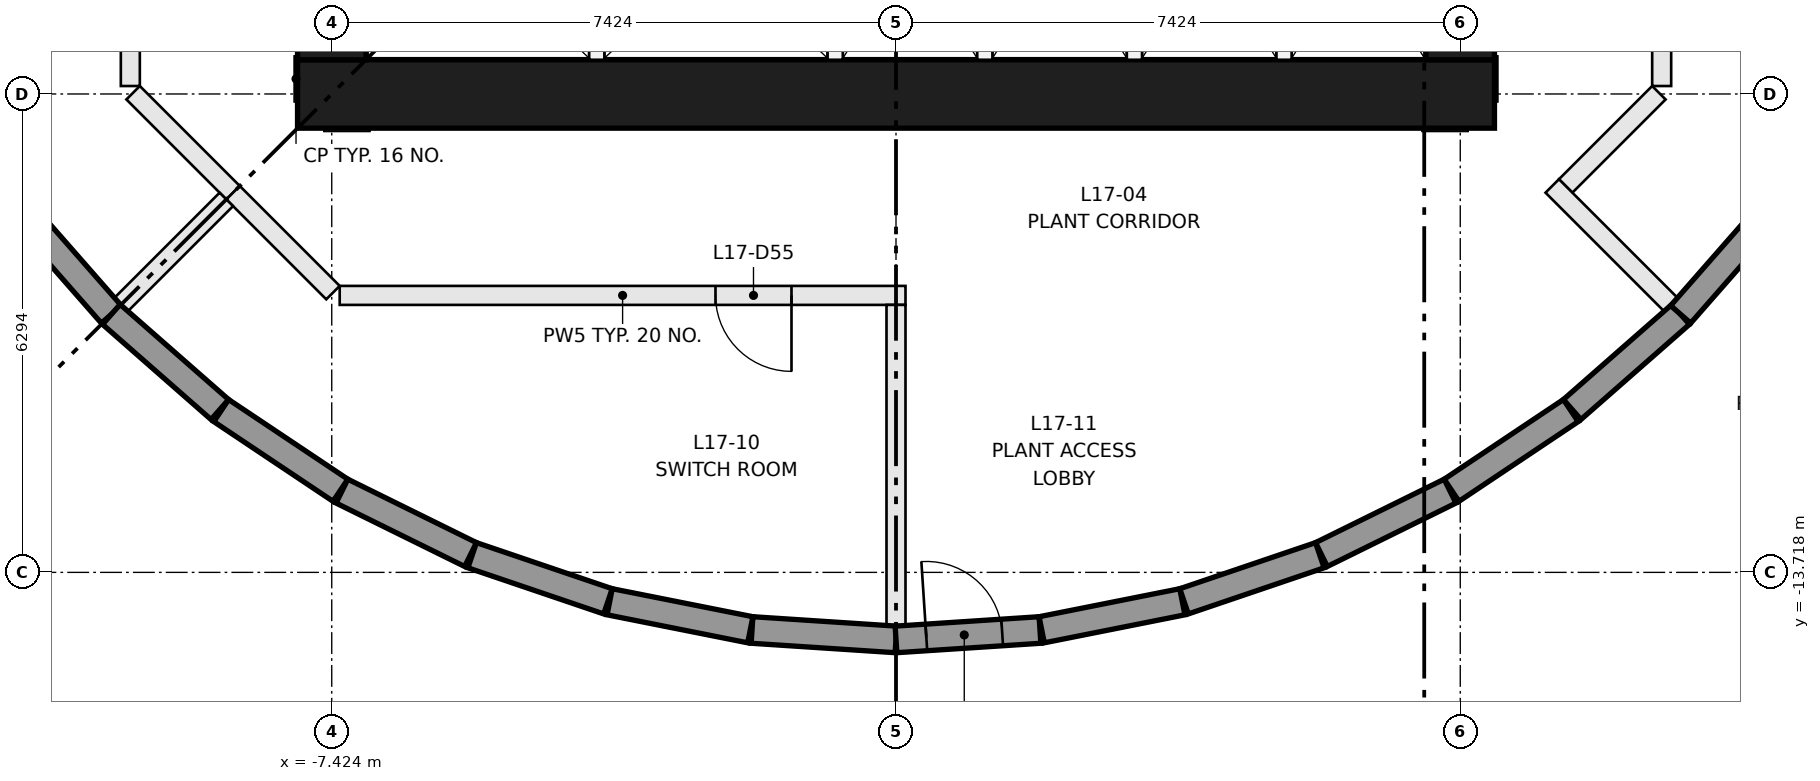
"""IFC4 building model, lengths in metres.
Left out: names, types, materials, properties, quantities, classifications, styles, units other than length and angle.
Written with IfcOpenShell. Run it as: python <this file> out.ifc"""

import sys

from ifc_helpers import new_model, si_unit, direction, frame, frame_2d, origin, place, context, subcontext, project, spatial, rectangle, extrude, element, fill, save


model = new_model("IFC4")
c1 = context("Model", 3, precision=1e-05, world=origin(), true_north=direction((0.0, 1.0)))
c2 = subcontext(c1, "Body", "Model", "MODEL_VIEW")
j1 = project(units=[si_unit("LENGTHUNIT", "METRE"), si_unit("PLANEANGLEUNIT", "RADIAN")], contexts=[c1])
p1 = place(None, origin())
s1 = spatial("IfcSite", under=j1, at=p1, CompositionType="ELEMENT")
p2 = place(p1, origin())
s2 = spatial("IfcBuilding", under=s1, at=p2, CompositionType="ELEMENT")
p3 = place(p2, frame((0.0, 0.0, 66.35)))
s3 = spatial("IfcBuildingStorey", under=s2, at=p3, CompositionType="ELEMENT", Elevation=66.35)
p4 = place(p3, frame((-7.874, -7.424, 0.0), z_axis=(0.0, 0.0, 1.0), x_axis=(1.0, 0.0, 0.0)))
e1 = element("IfcWall", 1, at=p4, inside=s3, PredefinedType="SHEAR", context=c2, shape_type="SweptSolid", body=[
    extrude(rectangle(XDim=15.748, YDim=0.9, at=frame_2d((7.874, 0.0))), origin(), (0.0, 0.0, 1.0), 6.4),
])
p5 = place(p3, frame((-7.424, -6.974, 0.0), z_axis=(0.0, 0.0, 1.0), x_axis=(0.0, 1.0, 0.0)))
e2 = element("IfcWall", 2, at=p5, inside=s3, PredefinedType="SHEAR", context=c2, shape_type="SweptSolid", body=[
    extrude(rectangle(XDim=13.948, YDim=0.9, at=frame_2d((6.974, 0.0))), origin(), (0.0, 0.0, 1.0), 6.4),
])
p6 = place(p5, frame((6.474, 0.0, 0.0)))
e3 = element("IfcOpeningElement", 3, at=p6, cuts=e2, PredefinedType="OPENING", context=c2, shape_type="SweptSolid", body=[
    extrude(rectangle(XDim=1.0, YDim=2.1, at=frame_2d((0.5, 1.05))), frame((0.0, 0.46, 0.0), z_axis=(0.0, -1.0, 0.0), x_axis=(1.0, 0.0, 0.0)), (0.0, 0.0, 1.0), 0.92),
])
p7 = place(p5, frame((3.35, 0.0, 0.0)))
e4 = element("IfcOpeningElement", 4, at=p7, cuts=e2, PredefinedType="OPENING", context=c2, shape_type="SweptSolid", body=[
    extrude(rectangle(XDim=1.8, YDim=2.1, at=frame_2d((0.9, 1.05))), frame((0.0, 0.46, 0.0), z_axis=(0.0, -1.0, 0.0), x_axis=(1.0, 0.0, 0.0)), (0.0, 0.0, 1.0), 0.92),
])
p8 = place(p5, frame((8.799, 0.0, 0.0)))
e5 = element("IfcOpeningElement", 5, at=p8, cuts=e2, PredefinedType="OPENING", context=c2, shape_type="SweptSolid", body=[
    extrude(rectangle(XDim=1.8, YDim=2.1, at=frame_2d((0.9, 1.05))), frame((0.0, 0.46, 0.0), z_axis=(0.0, -1.0, 0.0), x_axis=(1.0, 0.0, 0.0)), (0.0, 0.0, 1.0), 0.92),
])
p9 = place(p5, frame((11.974, 0.0, 0.0)))
e6 = element("IfcOpeningElement", 6, at=p9, cuts=e2, PredefinedType="OPENING", context=c2, shape_type="SweptSolid", body=[
    extrude(rectangle(XDim=1.0, YDim=2.1, at=frame_2d((0.5, 1.05))), frame((0.0, 0.46, 0.0), z_axis=(0.0, -1.0, 0.0), x_axis=(1.0, 0.0, 0.0)), (0.0, 0.0, 1.0), 0.92),
])
p10 = place(p3, frame((7.424, -6.974, 0.0), z_axis=(0.0, 0.0, 1.0), x_axis=(0.0, 1.0, 0.0)))
e7 = element("IfcWall", 7, at=p10, inside=s3, PredefinedType="SHEAR", context=c2, shape_type="SweptSolid", body=[
    extrude(rectangle(XDim=13.948, YDim=0.9, at=frame_2d((6.974, 0.0))), origin(), (0.0, 0.0, 1.0), 6.4),
])
p11 = place(p10, frame((6.474, 0.0, 0.0)))
e8 = element("IfcOpeningElement", 8, at=p11, cuts=e7, PredefinedType="OPENING", context=c2, shape_type="SweptSolid", body=[
    extrude(rectangle(XDim=1.0, YDim=2.1, at=frame_2d((0.5, 1.05))), frame((0.0, 0.46, 0.0), z_axis=(0.0, -1.0, 0.0), x_axis=(1.0, 0.0, 0.0)), (0.0, 0.0, 1.0), 0.92),
])
p12 = place(p10, frame((3.35, 0.0, 0.0)))
e9 = element("IfcOpeningElement", 9, at=p12, cuts=e7, PredefinedType="OPENING", context=c2, shape_type="SweptSolid", body=[
    extrude(rectangle(XDim=1.8, YDim=2.1, at=frame_2d((0.9, 1.05))), frame((0.0, 0.46, 0.0), z_axis=(0.0, -1.0, 0.0), x_axis=(1.0, 0.0, 0.0)), (0.0, 0.0, 1.0), 0.92),
])
p13 = place(p10, frame((8.799, 0.0, 0.0)))
e10 = element("IfcOpeningElement", 10, at=p13, cuts=e7, PredefinedType="OPENING", context=c2, shape_type="SweptSolid", body=[
    extrude(rectangle(XDim=1.8, YDim=2.1, at=frame_2d((0.9, 1.05))), frame((0.0, 0.46, 0.0), z_axis=(0.0, -1.0, 0.0), x_axis=(1.0, 0.0, 0.0)), (0.0, 0.0, 1.0), 0.92),
])
for number, where, z_axis, x_axis in (
    (11, (-3.937, -6.974, 0.0), (0.0, 0.0, 1.0), (0.0, 1.0, 0.0)),
    (12, (-0.8, -6.974, 0.0), (0.0, 0.0, 1.0), (0.0, 1.0, 0.0)),
    (13, (1.168, -6.974, 0.0), (0.0, 0.0, 1.0), (0.0, 1.0, 0.0)),
    (14, (3.137, -6.974, 0.0), (0.0, 0.0, 1.0), (0.0, 1.0, 0.0)),
    (15, (5.105, -6.974, 0.0), (0.0, 0.0, 1.0), (0.0, 1.0, 0.0)),
):
    element("IfcWall", number, at=place(p3, frame(where, z_axis=z_axis, x_axis=x_axis)), inside=s3, PredefinedType="PARTITIONING", context=c2, shape_type="SweptSolid", body=[
        extrude(rectangle(XDim=2.8, YDim=0.2, at=frame_2d((1.4, 0.0))), origin(), (0.0, 0.0, 1.0), 6.05),
    ])
p14 = place(p3, frame((10.037, -7.408, 0.0), z_axis=(0.0, 0.0, 1.0), x_axis=(-0.707177157576, -0.707036397792, 0.0)))
e16 = element("IfcWall", 16, at=p14, inside=s3, PredefinedType="PARTITIONING", context=c2, shape_type="SweptSolid", body=[
    extrude(rectangle(XDim=1.734, YDim=0.25, at=frame_2d((0.867, 0.0))), origin(), (0.0, 0.0, 1.0), 6.05),
])
p15 = place(p3, frame((10.074, 0.0, 0.0), z_axis=(0.0, 0.0, 1.0), x_axis=(0.0, -1.0, 0.0)))
e17 = element("IfcWall", 17, at=p15, inside=s3, PredefinedType="PARTITIONING", context=c2, shape_type="SweptSolid", body=[
    extrude(rectangle(XDim=7.319, YDim=0.25, at=frame_2d((3.66, 0.0))), origin(), (0.0, 0.0, 1.0), 6.05),
])
p16 = place(p15, frame((1.3, 0.0, 0.0)))
e18 = element("IfcOpeningElement", 18, at=p16, cuts=e17, PredefinedType="OPENING", context=c2, shape_type="SweptSolid", body=[
    extrude(rectangle(XDim=1.0, YDim=2.1, at=frame_2d((0.5, 1.05))), frame((0.0, 0.135, 0.0), z_axis=(0.0, -1.0, 0.0), x_axis=(1.0, 0.0, 0.0)), (0.0, 0.0, 1.0), 0.27),
])
p17 = place(p3, frame((-10.074, -7.319, 0.0), z_axis=(0.0, 0.0, 1.0), x_axis=(0.0, 1.0, 0.0)))
e19 = element("IfcWall", 19, at=p17, inside=s3, PredefinedType="PARTITIONING", context=c2, shape_type="SweptSolid", body=[
    extrude(rectangle(XDim=7.319, YDim=0.25, at=frame_2d((3.66, 0.0))), origin(), (0.0, 0.0, 1.0), 6.05),
])
p18 = place(p17, frame((5.0, 0.0, 0.0)))
e20 = element("IfcOpeningElement", 20, at=p18, cuts=e19, PredefinedType="OPENING", context=c2, shape_type="SweptSolid", body=[
    extrude(rectangle(XDim=1.0, YDim=2.1, at=frame_2d((0.5, 1.05))), frame((0.0, 0.135, 0.0), z_axis=(0.0, -1.0, 0.0), x_axis=(1.0, 0.0, 0.0)), (0.0, 0.0, 1.0), 0.27),
])
for number, where, z_axis, x_axis in (
    (21, (-8.722, -8.722, 0.0), (0.0, 0.0, 1.0), (-0.707, 0.707, 0.0)),
    (22, (-7.408, -10.037, 0.0), (0.0, 0.0, 1.0), (-0.707, 0.707, 0.0)),
):
    element("IfcWall", number, at=place(p3, frame(where, z_axis=z_axis, x_axis=x_axis)), inside=s3, PredefinedType="PARTITIONING", context=c2, shape_type="SweptSolid", body=[
        extrude(rectangle(XDim=1.859, YDim=0.25, at=frame_2d((0.93, 0.0))), origin(), (0.0, 0.0, 1.0), 6.05),
    ])
p19 = place(p3, frame((0.125, -10.074, 0.0), z_axis=(0.0, 0.0, 1.0), x_axis=(-1.0, 0.0, 0.0)))
e23 = element("IfcWall", 23, at=p19, inside=s3, PredefinedType="PARTITIONING", context=c2, shape_type="SweptSolid", body=[
    extrude(rectangle(XDim=7.444, YDim=0.25, at=frame_2d((3.722, 0.0))), origin(), (0.0, 0.0, 1.0), 6.05),
])
p20 = place(p19, frame((1.5, 0.0, 0.0)))
e24 = element("IfcOpeningElement", 24, at=p20, cuts=e23, PredefinedType="OPENING", context=c2, shape_type="SweptSolid", body=[
    extrude(rectangle(XDim=1.0, YDim=2.1, at=frame_2d((0.5, 1.05))), frame((0.0, 0.135, 0.0), z_axis=(0.0, -1.0, 0.0), x_axis=(1.0, 0.0, 0.0)), (0.0, 0.0, 1.0), 0.27),
])
p21 = place(p3, frame((-10.324, -10.324, 0.0), z_axis=(0.0, 0.0, 1.0), x_axis=(-0.659360034108, 0.751827337506, 0.0)))
e25 = element("IfcWall", 25, at=p21, inside=s3, PredefinedType="PARTITIONING", context=c2, shape_type="SweptSolid", body=[
    extrude(rectangle(XDim=1.898, YDim=0.35, at=frame_2d((0.949, 0.0))), origin(), (0.0, 0.0, 1.0), 6.05),
])
p22 = place(p3, frame((-8.811, -8.811, 0.0), z_axis=(0.0, 0.0, 1.0), x_axis=(-0.707106781187, -0.707106781187, 0.0)))
e26 = element("IfcWall", 26, at=p22, inside=s3, PredefinedType="PARTITIONING", context=c2, shape_type="SweptSolid", body=[
    extrude(rectangle(XDim=1.956, YDim=0.25, at=frame_2d((0.978, 0.0))), origin(), (0.0, 0.0, 1.0), 6.05),
])
p23 = place(p3, frame((-8.896, -11.575, 0.0), z_axis=(0.0, 0.0, 1.0), x_axis=(-0.751827337506, 0.659360034108, 0.0)))
e27 = element("IfcWall", 27, at=p23, inside=s3, PredefinedType="PARTITIONING", context=c2, shape_type="SweptSolid", body=[
    extrude(rectangle(XDim=1.898, YDim=0.35, at=frame_2d((0.949, 0.0))), origin(), (0.0, 0.0, 1.0), 6.05),
])
p24 = place(p3, frame((-7.31, -12.638, 0.0), z_axis=(0.0, 0.0, 1.0), x_axis=(-0.831452632931, 0.555595643605, 0.0)))
e28 = element("IfcWall", 28, at=p24, inside=s3, PredefinedType="PARTITIONING", context=c2, shape_type="SweptSolid", body=[
    extrude(rectangle(XDim=1.887, YDim=0.35, at=frame_2d((0.943, 0.0))), origin(), (0.0, 0.0, 1.0), 6.05),
])
for number, where, z_axis, x_axis in (
    (29, (-5.597, -13.483, 0.0), (0.0, 0.0, 1.0), (-0.897, 0.442, 0.0)),
    (30, (-3.79, -14.099, 0.0), (0.0, 0.0, 1.0), (-0.947, 0.322, 0.0)),
):
    element("IfcWall", number, at=place(p3, frame(where, z_axis=z_axis, x_axis=x_axis)), inside=s3, PredefinedType="PARTITIONING", context=c2, shape_type="SweptSolid", body=[
        extrude(rectangle(XDim=1.887, YDim=0.35, at=frame_2d((0.943, 0.0))), origin(), (0.0, 0.0, 1.0), 6.05),
    ])
p25 = place(p3, frame((-1.917, -14.473, 0.0), z_axis=(0.0, 0.0, 1.0), x_axis=(-0.980779232714, 0.195120723342, 0.0)))
e31 = element("IfcWall", 31, at=p25, inside=s3, PredefinedType="PARTITIONING", context=c2, shape_type="SweptSolid", body=[
    extrude(rectangle(XDim=1.887, YDim=0.35, at=frame_2d((0.943, 0.0))), origin(), (0.0, 0.0, 1.0), 6.05),
])
p26 = place(p3, frame((0.0, -14.6, 0.0), z_axis=(0.0, 0.0, 1.0), x_axis=(-0.997855159135, 0.065460533058, 0.0)))
e32 = element("IfcWall", 32, at=p26, inside=s3, PredefinedType="PARTITIONING", context=c2, shape_type="SweptSolid", body=[
    extrude(rectangle(XDim=1.898, YDim=0.35, at=frame_2d((0.949, 0.0))), origin(), (0.0, 0.0, 1.0), 6.05),
])
p27 = place(p3, frame((0.0, -10.199, 0.0), z_axis=(0.0, 0.0, 1.0), x_axis=(0.0, -1.0, 0.0)))
e33 = element("IfcWall", 33, at=p27, inside=s3, PredefinedType="PARTITIONING", context=c2, shape_type="SweptSolid", body=[
    extrude(rectangle(XDim=4.218, YDim=0.25, at=frame_2d((2.109, 0.0))), origin(), (0.0, 0.0, 1.0), 6.05),
])
p28 = place(p3, frame((0.0, -14.6, 0.0), z_axis=(0.0, 0.0, 1.0), x_axis=(0.997855159135, 0.065460533058, 0.0)))
e34 = element("IfcWall", 34, at=p28, inside=s3, PredefinedType="PARTITIONING", context=c2, shape_type="SweptSolid", body=[
    extrude(rectangle(XDim=1.898, YDim=0.35, at=frame_2d((0.949, 0.0))), origin(), (0.0, 0.0, 1.0), 6.05),
])
p29 = place(p28, frame((0.4, 0.0, 0.0)))
e35 = element("IfcOpeningElement", 35, at=p29, cuts=e34, PredefinedType="OPENING", context=c2, shape_type="SweptSolid", body=[
    extrude(rectangle(XDim=1.0, YDim=2.1, at=frame_2d((0.5, 1.05))), frame((0.0, 0.185, 0.0), z_axis=(0.0, -1.0, 0.0), x_axis=(1.0, 0.0, 0.0)), (0.0, 0.0, 1.0), 0.37),
])
p30 = place(p3, frame((3.768, -14.105, 0.0), z_axis=(0.0, 0.0, 1.0), x_axis=(-0.980779232714, -0.195120723342, 0.0)))
e36 = element("IfcWall", 36, at=p30, inside=s3, PredefinedType="PARTITIONING", context=c2, shape_type="SweptSolid", body=[
    extrude(rectangle(XDim=1.887, YDim=0.35, at=frame_2d((0.943, 0.0))), origin(), (0.0, 0.0, 1.0), 6.05),
])
for number, where, z_axis, x_axis in (
    (37, (5.576, -13.492, 0.0), (0.0, 0.0, 1.0), (-0.947, -0.322, 0.0)),
    (38, (7.29, -12.649, 0.0), (0.0, 0.0, 1.0), (-0.897, -0.442, 0.0)),
):
    element("IfcWall", number, at=place(p3, frame(where, z_axis=z_axis, x_axis=x_axis)), inside=s3, PredefinedType="PARTITIONING", context=c2, shape_type="SweptSolid", body=[
        extrude(rectangle(XDim=1.887, YDim=0.35, at=frame_2d((0.943, 0.0))), origin(), (0.0, 0.0, 1.0), 6.05),
    ])
p31 = place(p3, frame((8.878, -11.589, 0.0), z_axis=(0.0, 0.0, 1.0), x_axis=(-0.831452632931, -0.555595643605, 0.0)))
e39 = element("IfcWall", 39, at=p31, inside=s3, PredefinedType="PARTITIONING", context=c2, shape_type="SweptSolid", body=[
    extrude(rectangle(XDim=1.887, YDim=0.35, at=frame_2d((0.943, 0.0))), origin(), (0.0, 0.0, 1.0), 6.05),
])
p32 = place(p3, frame((10.324, -10.324, 0.0), z_axis=(0.0, 0.0, 1.0), x_axis=(-0.751827337506, -0.659360034108, 0.0)))
e40 = element("IfcWall", 40, at=p32, inside=s3, PredefinedType="PARTITIONING", context=c2, shape_type="SweptSolid", body=[
    extrude(rectangle(XDim=1.898, YDim=0.35, at=frame_2d((0.949, 0.0))), origin(), (0.0, 0.0, 1.0), 6.05),
])
p33 = place(p3, frame((8.634, -8.634, 0.0), z_axis=(0.0, 0.0, 1.0), x_axis=(0.707106781187, -0.707106781187, 0.0)))
e41 = element("IfcWall", 41, at=p33, inside=s3, PredefinedType="PARTITIONING", context=c2, shape_type="SweptSolid", body=[
    extrude(rectangle(XDim=2.206, YDim=0.25, at=frame_2d((1.103, 0.0))), origin(), (0.0, 0.0, 1.0), 6.05),
])
p34 = place(p3, frame((11.575, -8.896, 0.0), z_axis=(0.0, 0.0, 1.0), x_axis=(-0.659360034108, -0.751827337506, 0.0)))
e42 = element("IfcWall", 42, at=p34, inside=s3, PredefinedType="PARTITIONING", context=c2, shape_type="SweptSolid", body=[
    extrude(rectangle(XDim=1.898, YDim=0.35, at=frame_2d((0.949, 0.0))), origin(), (0.0, 0.0, 1.0), 6.05),
])
p35 = place(p20, origin())
e43 = element("IfcDoor", 43, at=p35, inside=s3, OperationType="SINGLE_SWING_LEFT", PredefinedType="DOOR", context=c2, shape_type="SweptSolid", body=[
    extrude(rectangle(XDim=1.0, YDim=2.1, at=frame_2d((0.5, 1.05))), frame((0.0, 0.025, 0.0), z_axis=(0.0, -1.0, 0.0), x_axis=(1.0, 0.0, 0.0)), (0.0, 0.0, 1.0), 0.05),
])
fill(e24, e43)
p36 = place(p29, origin())
e44 = element("IfcDoor", 44, at=p36, inside=s3, OperationType="SINGLE_SWING_LEFT", PredefinedType="DOOR", context=c2, shape_type="SweptSolid", body=[
    extrude(rectangle(XDim=1.0, YDim=2.1, at=frame_2d((0.5, 1.05))), frame((0.0, 0.025, 0.0), z_axis=(0.0, -1.0, 0.0), x_axis=(1.0, 0.0, 0.0)), (0.0, 0.0, 1.0), 0.05),
])
fill(e35, e44)
save(model, sys.argv[1])
